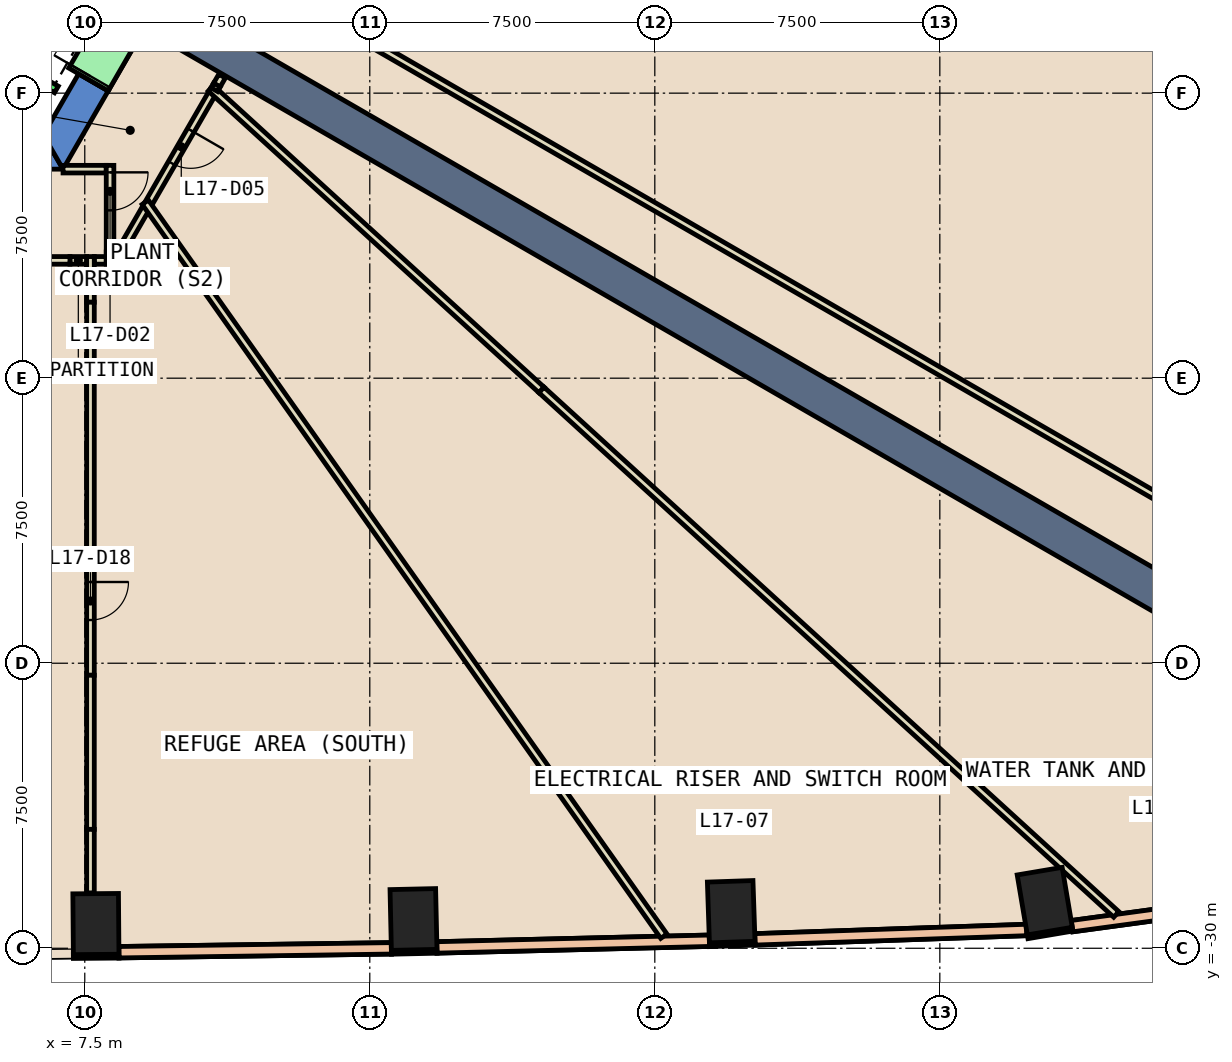
"""IFC4 building model, lengths in metres.
Left out: names, types, materials, properties, quantities, classifications, styles, units other than length and angle.
Written with IfcOpenShell. Run it as: python <this file> out.ifc"""

import sys

from ifc_helpers import new_model, si_unit, direction, frame, frame_2d, origin, origin_2d, place, context, subcontext, project, spatial, polyline, rectangle, outline, extrude, element, fill, save


model = new_model("IFC4")
c1 = context("Model", 3, precision=1e-05, world=origin(), true_north=direction((0.0, 1.0)))
c2 = subcontext(c1, "Body", "Model", "MODEL_VIEW")
j1 = project(units=[si_unit("LENGTHUNIT", "METRE"), si_unit("PLANEANGLEUNIT", "RADIAN")], contexts=[c1])
p1 = place(None, origin())
s1 = spatial("IfcSite", under=j1, at=p1, CompositionType="ELEMENT")
p2 = place(p1, origin())
s2 = spatial("IfcBuilding", under=s1, at=p2, CompositionType="ELEMENT")
p3 = place(p2, frame((0.0, 0.0, 81.2)))
s3 = spatial("IfcBuildingStorey", under=s2, at=p3, CompositionType="ELEMENT", Elevation=81.2)
for number, where, z_axis, x_axis in (
    (1, (7.793, -29.363, -0.6), (0.0, 0.0, 1.0), (1.0, 0.008, 0.0)),
    (2, (16.15, -29.243, -0.6), (0.0, 0.0, 1.0), (1.0, 0.022, 0.0)),
    (3, (24.51, -29.038, -0.6), (0.0, 0.0, 1.0), (0.999, 0.034, 0.0)),
    (4, (32.761, -28.76, -0.6), (0.0, 0.0, 1.0), (0.986, 0.167, 0.0)),
):
    element("IfcColumn", number, at=place(p3, frame(where, z_axis=z_axis, x_axis=x_axis)), inside=s3, PredefinedType="COLUMN", context=c2, shape_type="SweptSolid", body=[
        extrude(rectangle(XDim=1.2, YDim=1.6, at=origin_2d()), origin(), (0.0, 0.0, 1.0), 5.4),
    ])
p4 = place(p3, frame((0.0, 0.0, -0.6)))
e5 = element("IfcWall", 5, at=p4, inside=s3, PredefinedType="SHEAR", context=c2, shape_type="SweptSolid", body=[
    extrude(outline(polyline([(5.58, -8.6), (5.58, -9.5), (6.928, -9.5), (6.409, -8.6), (5.58, -8.6)])), origin(), (0.0, 0.0, 1.0), 5.4),
])
p5 = place(p3, frame((0.0, 0.0, -0.6)))
e6 = element("IfcWall", 6, at=p5, inside=s3, PredefinedType="SHEAR", context=c2, shape_type="SweptSolid", body=[
    extrude(outline(polyline([(8.117, -7.44), (7.338, -6.99), (6.409, -8.6), (6.928, -9.5), (8.117, -7.44)])), origin(), (0.0, 0.0, 1.0), 5.4),
])
p6 = place(p3, frame((0.0, 0.0, 3.6)))
e7 = element("IfcWall", 7, at=p6, inside=s3, PredefinedType="SHEAR", context=c2, shape_type="SweptSolid", body=[
    extrude(outline(polyline([(8.767, -6.314), (7.988, -5.864), (7.338, -6.99), (8.117, -7.44), (8.767, -6.314)])), origin(), (0.0, 0.0, 1.0), 1.2),
])
p7 = place(p3, frame((9.31, -5.375, 0.0), z_axis=(0.0, 0.0, 1.0), x_axis=(0.866022967049, -0.500004220526, 0.0)))
e8 = element("IfcWall", 8, at=p7, inside=s3, PredefinedType="SHEAR", context=c2, shape_type="SweptSolid", body=[
    extrude(rectangle(XDim=35.802, YDim=1.0, at=frame_2d((17.901, 0.0))), origin(), (0.0, 0.0, 1.0), 4.8),
])
p8 = place(p3, frame((7.2, -30.218, 0.0), z_axis=(0.0, 0.0, 1.0), x_axis=(0.999965208912, 0.008341520563, 0.0)))
e9 = element("IfcWall", 9, at=p8, inside=s3, PredefinedType="STANDARD", context=c2, shape_type="SweptSolid", body=[
    extrude(rectangle(XDim=1.2, YDim=0.1, at=frame_2d((0.6, 0.0))), origin(), (0.0, 0.0, 1.0), 4.8),
])
p9 = place(p3, frame((15.569, -30.106, 0.0), z_axis=(0.0, 0.0, 1.0), x_axis=(0.99976752127, 0.021561618973, 0.0)))
e10 = element("IfcWall", 10, at=p9, inside=s3, PredefinedType="STANDARD", context=c2, shape_type="SweptSolid", body=[
    extrude(rectangle(XDim=1.2, YDim=0.1, at=frame_2d((0.6, 0.0))), origin(), (0.0, 0.0, 1.0), 4.8),
])
for number, where, z_axis, x_axis in (
    (11, (23.939, -29.907, 0.0), (0.0, 0.0, 1.0), (0.999, 0.033, 0.0)),
    (12, (32.311, -29.698, 0.0), (0.0, 0.0, 1.0), (0.986, 0.167, 0.0)),
):
    element("IfcWall", number, at=place(p3, frame(where, z_axis=z_axis, x_axis=x_axis)), inside=s3, PredefinedType="STANDARD", context=c2, shape_type="SweptSolid", body=[
        extrude(rectangle(XDim=1.2, YDim=0.1, at=frame_2d((0.6, 0.0))), origin(), (0.0, 0.0, 1.0), 4.8),
    ])
p10 = place(p3, frame((8.398, -30.104, 0.0), z_axis=(0.0, 0.0, 1.0), x_axis=(0.999898730591, 0.014231253001, 0.0)))
e13 = element("IfcWall", 13, at=p10, inside=s3, PredefinedType="STANDARD", context=c2, shape_type="SweptSolid", body=[
    extrude(rectangle(XDim=7.171, YDim=0.3, at=frame_2d((3.585, 0.0))), origin(), (0.0, 0.0, 1.0), 1.2),
])
p11 = place(p3, frame((8.398, -30.104, 4.0), z_axis=(0.0, 0.0, 1.0), x_axis=(0.999898730591, 0.014231253001, 0.0)))
e14 = element("IfcWall", 14, at=p11, inside=s3, PredefinedType="STANDARD", context=c2, shape_type="SweptSolid", body=[
    extrude(rectangle(XDim=7.171, YDim=0.3, at=frame_2d((3.585, 0.0))), origin(), (0.0, 0.0, 1.0), 0.8),
])
p12 = place(p3, frame((16.765, -29.978, 0.0), z_axis=(0.0, 0.0, 1.0), x_axis=(0.999698874369, 0.024538960556, 0.0)))
e15 = element("IfcWall", 15, at=p12, inside=s3, PredefinedType="STANDARD", context=c2, shape_type="SweptSolid", body=[
    extrude(rectangle(XDim=7.173, YDim=0.3, at=frame_2d((3.587, 0.0))), origin(), (0.0, 0.0, 1.0), 1.2),
])
p13 = place(p3, frame((16.765, -29.978, 4.0), z_axis=(0.0, 0.0, 1.0), x_axis=(0.999698874369, 0.024538960556, 0.0)))
e16 = element("IfcWall", 16, at=p13, inside=s3, PredefinedType="STANDARD", context=c2, shape_type="SweptSolid", body=[
    extrude(rectangle(XDim=7.173, YDim=0.3, at=frame_2d((3.587, 0.0))), origin(), (0.0, 0.0, 1.0), 0.8),
])
p14 = place(p3, frame((25.134, -29.766, 0.0), z_axis=(0.0, 0.0, 1.0), x_axis=(0.999403158142, 0.034544572581, 0.0)))
e17 = element("IfcWall", 17, at=p14, inside=s3, PredefinedType="STANDARD", context=c2, shape_type="SweptSolid", body=[
    extrude(rectangle(XDim=7.152, YDim=0.3, at=frame_2d((3.576, 0.0))), origin(), (0.0, 0.0, 1.0), 1.2),
])
p15 = place(p3, frame((25.134, -29.766, 4.0), z_axis=(0.0, 0.0, 1.0), x_axis=(0.999403158142, 0.034544572581, 0.0)))
e18 = element("IfcWall", 18, at=p15, inside=s3, PredefinedType="STANDARD", context=c2, shape_type="SweptSolid", body=[
    extrude(rectangle(XDim=7.152, YDim=0.3, at=frame_2d((3.576, 0.0))), origin(), (0.0, 0.0, 1.0), 0.8),
])
p16 = place(p3, frame((33.48, -29.418, 0.0), z_axis=(0.0, 0.0, 1.0), x_axis=(0.990894840534, 0.134638088972, 0.0)))
e19 = element("IfcWall", 19, at=p16, inside=s3, PredefinedType="STANDARD", context=c2, shape_type="SweptSolid", body=[
    extrude(rectangle(XDim=4.472, YDim=0.3, at=frame_2d((2.236, 0.0))), origin(), (0.0, 0.0, 1.0), 1.2),
])
p17 = place(p3, frame((33.48, -29.418, 4.0), z_axis=(0.0, 0.0, 1.0), x_axis=(0.990894840534, 0.134638088972, 0.0)))
e20 = element("IfcWall", 20, at=p17, inside=s3, PredefinedType="STANDARD", context=c2, shape_type="SweptSolid", body=[
    extrude(rectangle(XDim=4.472, YDim=0.3, at=frame_2d((2.236, 0.0))), origin(), (0.0, 0.0, 1.0), 0.8),
])
p18 = place(p3, frame((38.311, -6.819, 0.0), z_axis=(0.0, 0.0, 1.0), x_axis=(-0.476762519224, 0.879032138356, 0.0)))
e21 = element("IfcWall", 21, at=p18, inside=s3, PredefinedType="STANDARD", context=c2, shape_type="SweptSolid", body=[
    extrude(rectangle(XDim=6.135, YDim=0.3, at=frame_2d((3.068, 0.0))), origin(), (0.0, 0.0, 1.0), 1.2),
])
p19 = place(p3, frame((38.311, -6.819, 4.0), z_axis=(0.0, 0.0, 1.0), x_axis=(-0.476762519224, 0.879032138356, 0.0)))
e22 = element("IfcWall", 22, at=p19, inside=s3, PredefinedType="STANDARD", context=c2, shape_type="SweptSolid", body=[
    extrude(rectangle(XDim=6.135, YDim=0.3, at=frame_2d((3.068, 0.0))), origin(), (0.0, 0.0, 1.0), 0.8),
])
p20 = place(p3, frame((7.55, -11.9, 0.0), z_axis=(0.0, 0.0, 1.0), x_axis=(-1.0, 0.0, 0.0)))
e23 = element("IfcWall", 23, at=p20, inside=s3, PredefinedType="PARTITIONING", context=c2, shape_type="SweptSolid", body=[
    extrude(rectangle(XDim=0.44, YDim=0.2, at=frame_2d((0.22, 0.0))), origin(), (0.0, 0.0, 1.0), 2.4),
])
p21 = place(p3, frame((6.928, -9.5, 0.0), z_axis=(0.0, 0.0, 1.0), x_axis=(1.0, 0.0, 0.0)))
e24 = element("IfcWall", 24, at=p21, inside=s3, PredefinedType="PARTITIONING", context=c2, shape_type="SweptSolid", body=[
    extrude(rectangle(XDim=1.137, YDim=0.2, at=frame_2d((0.568, 0.0))), origin(), (0.0, 0.0, 1.0), 4.8),
])
p22 = place(p3, frame((8.165, -9.4, 0.0), z_axis=(0.0, 0.0, 1.0), x_axis=(0.0, -1.0, 0.0)))
e25 = element("IfcWall", 25, at=p22, inside=s3, PredefinedType="PARTITIONING", context=c2, shape_type="SweptSolid", body=[
    extrude(rectangle(XDim=2.278, YDim=0.2, at=frame_2d((1.139, 0.0))), origin(), (0.0, 0.0, 1.0), 4.8),
])
p23 = place(p22, frame((0.184, 0.0, 0.0)))
e26 = element("IfcOpeningElement", 26, at=p23, cuts=e25, PredefinedType="OPENING", context=c2, shape_type="SweptSolid", body=[
    extrude(rectangle(XDim=1.0, YDim=2.1, at=frame_2d((0.5, 1.05))), frame((0.0, 0.11, 0.0), z_axis=(0.0, -1.0, 0.0), x_axis=(1.0, 0.0, 0.0)), (0.0, 0.0, 1.0), 0.22),
])
p24 = place(p3, frame((8.065, -11.9, 0.0), z_axis=(0.0, 0.0, 1.0), x_axis=(-1.0, 0.0, 0.0)))
e27 = element("IfcWall", 27, at=p24, inside=s3, PredefinedType="PARTITIONING", context=c2, shape_type="SweptSolid", body=[
    extrude(rectangle(XDim=0.315, YDim=0.2, at=frame_2d((0.157, 0.0))), origin(), (0.0, 0.0, 1.0), 2.4),
])
p25 = place(p3, frame((7.65, -11.8, 0.0), z_axis=(0.0, 0.0, 1.0), x_axis=(0.0, -1.0, 0.0)))
e28 = element("IfcWall", 28, at=p25, inside=s3, PredefinedType="PARTITIONING", context=c2, shape_type="SweptSolid", body=[
    extrude(rectangle(XDim=1.201, YDim=0.2, at=frame_2d((0.601, 0.0))), origin(), (0.0, 0.0, 1.0), 2.4),
])
p26 = place(p3, frame((9.15, -10.451, 0.0), z_axis=(0.0, 0.0, 1.0), x_axis=(-0.499619156193, -0.866245172434, 0.0)))
e29 = element("IfcWall", 29, at=p26, inside=s3, PredefinedType="PARTITIONING", context=c2, shape_type="SweptSolid", body=[
    extrude(rectangle(XDim=1.773, YDim=0.2, at=frame_2d((0.887, 0.0))), origin(), (0.0, 0.0, 1.0), 4.8),
])
p27 = place(p3, frame((10.89, -7.437, 0.0), z_axis=(0.0, 0.0, 1.0), x_axis=(-0.499979528911, -0.866037222451, 0.0)))
e30 = element("IfcWall", 30, at=p27, inside=s3, PredefinedType="PARTITIONING", context=c2, shape_type="SweptSolid", body=[
    extrude(rectangle(XDim=3.48, YDim=0.2, at=frame_2d((1.74, 0.0))), origin(), (0.0, 0.0, 1.0), 4.8),
])
p28 = place(p27, frame((1.202, 0.0, 0.0)))
e31 = element("IfcOpeningElement", 31, at=p28, cuts=e30, PredefinedType="OPENING", context=c2, shape_type="SweptSolid", body=[
    extrude(rectangle(XDim=1.0, YDim=2.1, at=frame_2d((0.5, 1.05))), frame((0.0, 0.11, 0.0), z_axis=(0.0, -1.0, 0.0), x_axis=(1.0, 0.0, 0.0)), (0.0, 0.0, 1.0), 0.22),
])
p29 = place(p3, frame((11.113, -7.051, 0.0), z_axis=(0.0, 0.0, 1.0), x_axis=(-0.500262741071, -0.865873657005, 0.0)))
e32 = element("IfcWall", 32, at=p29, inside=s3, PredefinedType="PARTITIONING", context=c2, shape_type="SweptSolid", body=[
    extrude(rectangle(XDim=0.274, YDim=0.2, at=frame_2d((0.137, 0.0))), origin(), (0.0, 0.0, 1.0), 4.8),
])
p30 = place(p3, frame((9.092, -10.37, 0.0), z_axis=(0.0, 0.0, 1.0), x_axis=(0.577082807178, -0.816685639435, 0.0)))
e33 = element("IfcWall", 33, at=p30, inside=s3, PredefinedType="PARTITIONING", context=c2, shape_type="SweptSolid", body=[
    extrude(rectangle(XDim=23.646, YDim=0.2, at=frame_2d((11.823, 0.0))), origin(), (0.0, 0.0, 1.0), 4.8),
])
p31 = place(p3, frame((10.816, -7.37, 0.0), z_axis=(0.0, 0.0, 1.0), x_axis=(0.738759145077, -0.673969528662, 0.0)))
e34 = element("IfcWall", 34, at=p31, inside=s3, PredefinedType="PARTITIONING", context=c2, shape_type="SweptSolid", body=[
    extrude(rectangle(XDim=11.779, YDim=0.2, at=frame_2d((5.89, 0.0))), origin(), (0.0, 0.0, 1.0), 2.0),
])
p32 = place(p3, frame((12.729, -4.849, 0.0), z_axis=(0.0, 0.0, 1.0), x_axis=(0.866039668463, -0.499975292037, 0.0)))
e35 = element("IfcWall", 35, at=p32, inside=s3, PredefinedType="PARTITIONING", context=c2, shape_type="SweptSolid", body=[
    extrude(rectangle(XDim=33.573, YDim=0.2, at=frame_2d((16.787, 0.0))), origin(), (0.0, 0.0, 1.0), 4.8),
])
p33 = place(p3, frame((7.11, -11.9, 0.0), z_axis=(0.0, 0.0, 1.0), x_axis=(-1.0, 0.0, 0.0)))
e36 = element("IfcWall", 36, at=p33, inside=s3, PredefinedType="PARTITIONING", context=c2, shape_type="SweptSolid", body=[
    extrude(rectangle(XDim=0.959, YDim=0.2, at=frame_2d((0.479, 0.0))), origin(), (0.0, 0.0, 1.0), 4.8),
])
p34 = place(p3, frame((8.165, -11.678, 0.0), z_axis=(0.0, 0.0, 1.0), x_axis=(0.0, -1.0, 0.0)))
e37 = element("IfcWall", 37, at=p34, inside=s3, PredefinedType="PARTITIONING", context=c2, shape_type="SweptSolid", body=[
    extrude(rectangle(XDim=0.322, YDim=0.2, at=frame_2d((0.161, 0.0))), origin(), (0.0, 0.0, 1.0), 2.4),
])
p35 = place(p3, frame((7.65, -13.001, 0.0), z_axis=(0.0, 0.0, 1.0), x_axis=(0.0, -1.0, 0.0)))
e38 = element("IfcWall", 38, at=p35, inside=s3, PredefinedType="PARTITIONING", context=c2, shape_type="SweptSolid", body=[
    extrude(rectangle(XDim=9.815, YDim=0.2, at=frame_2d((4.907, 0.0))), origin(), (0.0, 0.0, 1.0), 4.8),
])
p36 = place(p35, frame((7.362, 0.0, 0.0)))
e39 = element("IfcOpeningElement", 39, at=p36, cuts=e38, PredefinedType="OPENING", context=c2, shape_type="SweptSolid", body=[
    extrude(rectangle(XDim=1.0, YDim=2.1, at=frame_2d((0.5, 1.05))), frame((0.0, 0.11, 0.0), z_axis=(0.0, -1.0, 0.0), x_axis=(1.0, 0.0, 0.0)), (0.0, 0.0, 1.0), 0.22),
])
p37 = place(p3, frame((7.65, -22.816, 0.0), z_axis=(0.0, 0.0, 1.0), x_axis=(0.0, -1.0, 0.0)))
e40 = element("IfcWall", 40, at=p37, inside=s3, PredefinedType="PARTITIONING", context=c2, shape_type="SweptSolid", body=[
    extrude(rectangle(XDim=4.055, YDim=0.2, at=frame_2d((2.028, 0.0))), origin(), (0.0, 0.0, 1.0), 2.4),
])
p38 = place(p3, frame((7.65, -26.871, 0.0), z_axis=(0.0, 0.0, 1.0), x_axis=(0.0, -1.0, 0.0)))
e41 = element("IfcWall", 41, at=p38, inside=s3, PredefinedType="PARTITIONING", context=c2, shape_type="SweptSolid", body=[
    extrude(rectangle(XDim=1.673, YDim=0.2, at=frame_2d((0.836, 0.0))), origin(), (0.0, 0.0, 1.0), 4.8),
])
p39 = place(p3, frame((10.976, -7.288, 0.0), z_axis=(0.0, 0.0, 1.0), x_axis=(-0.50243530011, -0.86461480973, 0.0)))
e42 = element("IfcWall", 42, at=p39, inside=s3, PredefinedType="PARTITIONING", context=c2, shape_type="SweptSolid", body=[
    extrude(rectangle(XDim=0.137, YDim=0.2, at=frame_2d((0.069, 0.0))), origin(), (0.0, 0.0, 1.0), 2.0),
])
p40 = place(p3, frame((19.518, -15.309, 0.0), z_axis=(0.0, 0.0, 1.0), x_axis=(0.738728109743, -0.674003545892, 0.0)))
e43 = element("IfcWall", 43, at=p40, inside=s3, PredefinedType="PARTITIONING", context=c2, shape_type="SweptSolid", body=[
    extrude(rectangle(XDim=20.474, YDim=0.2, at=frame_2d((10.237, 0.0))), origin(), (0.0, 0.0, 1.0), 4.8),
])
p41 = place(p3, frame((4.588, -6.153, 0.0), z_axis=(0.0, 0.0, 1.0), x_axis=(0.866022959057, -0.500004234368, 0.0)))
e44 = element("IfcWall", 44, at=p41, inside=s3, PredefinedType="STANDARD", context=c2, shape_type="SweptSolid", body=[
    extrude(rectangle(XDim=2.5, YDim=0.2, at=frame_2d((1.25, 0.0))), origin(), (0.0, 0.0, 1.0), 4.8),
])
p42 = place(p3, frame((7.598, -7.14, 0.0), z_axis=(0.0, 0.0, 1.0), x_axis=(0.500362116554, 0.865816234728, 0.0)))
e45 = element("IfcWall", 45, at=p42, inside=s3, PredefinedType="STANDARD", context=c2, shape_type="SweptSolid", body=[
    extrude(rectangle(XDim=1.299, YDim=1.2, at=frame_2d((0.65, 0.0))), origin(), (0.0, 0.0, 1.0), 2.4),
])
p43 = place(p42, frame((0.1, 0.0, 0.0)))
e46 = element("IfcOpeningElement", 46, at=p43, cuts=e45, PredefinedType="OPENING", context=c2, shape_type="SweptSolid", body=[
    extrude(rectangle(XDim=1.1, YDim=2.3, at=frame_2d((0.55, 1.15))), frame((0.0, 0.61, 0.0), z_axis=(0.0, -1.0, 0.0), x_axis=(1.0, 0.0, 0.0)), (0.0, 0.0, 1.0), 1.22),
])
p44 = place(p23, origin())
e47 = element("IfcDoor", 47, at=p44, inside=s3, OperationType="SINGLE_SWING_RIGHT", PredefinedType="DOOR", context=c2, shape_type="SweptSolid", body=[
    extrude(rectangle(XDim=1.0, YDim=2.1, at=frame_2d((0.5, 1.05))), frame((0.0, 0.025, 0.0), z_axis=(0.0, -1.0, 0.0), x_axis=(1.0, 0.0, 0.0)), (0.0, 0.0, 1.0), 0.05),
])
fill(e26, e47)
p45 = place(p28, origin())
e48 = element("IfcDoor", 48, at=p45, inside=s3, OperationType="SINGLE_SWING_LEFT", PredefinedType="DOOR", context=c2, shape_type="SweptSolid", body=[
    extrude(rectangle(XDim=1.0, YDim=2.1, at=frame_2d((0.5, 1.05))), frame((0.0, 0.025, 0.0), z_axis=(0.0, -1.0, 0.0), x_axis=(1.0, 0.0, 0.0)), (0.0, 0.0, 1.0), 0.05),
])
fill(e31, e48)
p46 = place(p36, origin())
e49 = element("IfcDoor", 49, at=p46, inside=s3, OperationType="SINGLE_SWING_RIGHT", PredefinedType="DOOR", context=c2, shape_type="SweptSolid", body=[
    extrude(rectangle(XDim=1.0, YDim=2.1, at=frame_2d((0.5, 1.05))), frame((0.0, 0.025, 0.0), z_axis=(0.0, -1.0, 0.0), x_axis=(1.0, 0.0, 0.0)), (0.0, 0.0, 1.0), 0.05),
])
fill(e39, e49)
p47 = place(p43, origin())
e50 = element("IfcDoor", 50, at=p47, inside=s3, OperationType="SLIDING_TO_LEFT", PredefinedType="DOOR", context=c2, shape_type="SweptSolid", body=[
    extrude(rectangle(XDim=1.1, YDim=2.3, at=frame_2d((0.55, 1.15))), frame((0.0, 0.025, 0.0), z_axis=(0.0, -1.0, 0.0), x_axis=(1.0, 0.0, 0.0)), (0.0, 0.0, 1.0), 0.05),
])
fill(e46, e50)
save(model, sys.argv[1])
